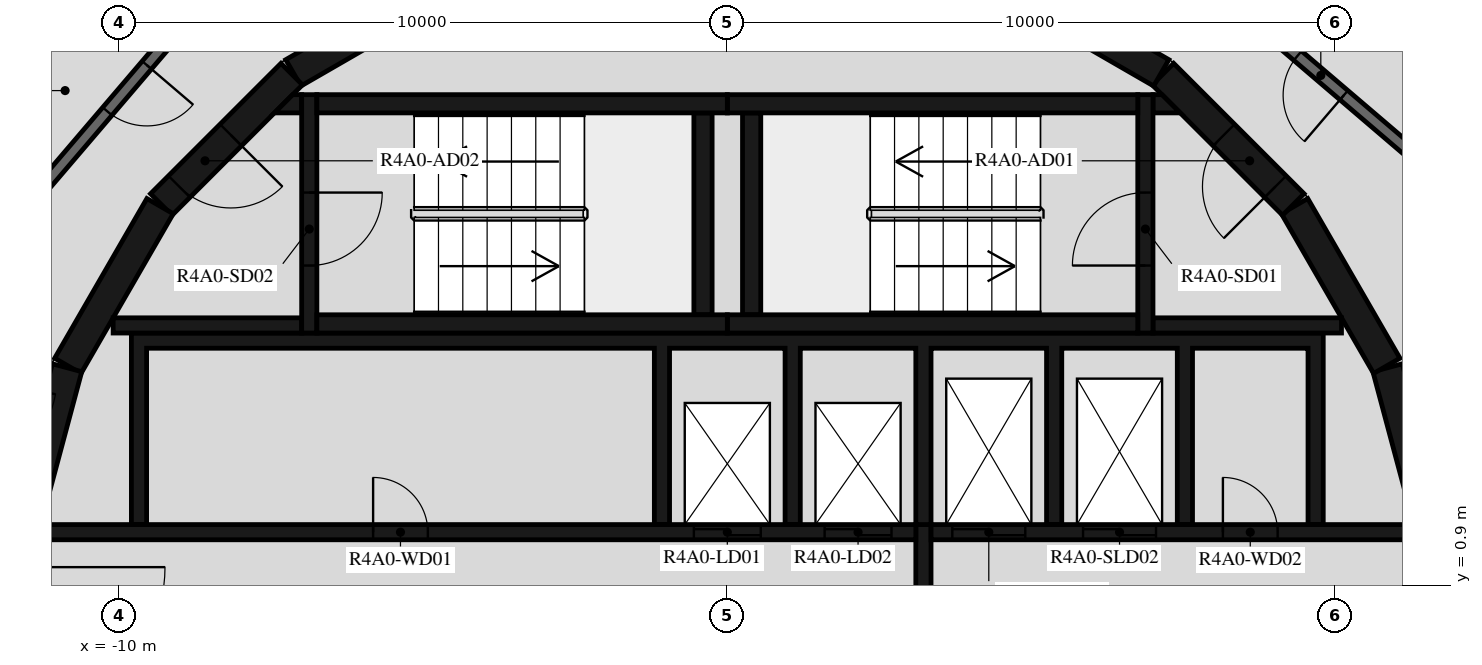
"""IFC4 building model, lengths in metres.
Left out: names, types, materials, properties, quantities, classifications, styles, units other than length and angle.
Written with IfcOpenShell. Run it as: python <this file> out.ifc"""

import sys

from ifc_helpers import new_model, si_unit, direction, frame, frame_2d, origin, place, context, subcontext, project, spatial, polyline, rectangle, outline, extrude, element, fill, save


model = new_model("IFC4")
c1 = context("Model", 3, precision=1e-05, world=origin(), true_north=direction((0.0, 1.0)))
c2 = subcontext(c1, "Body", "Model", "MODEL_VIEW")
j1 = project(units=[si_unit("LENGTHUNIT", "METRE"), si_unit("PLANEANGLEUNIT", "RADIAN")], contexts=[c1])
p1 = place(None, origin())
s1 = spatial("IfcSite", under=j1, at=p1, CompositionType="ELEMENT")
p2 = place(p1, origin())
s2 = spatial("IfcBuilding", under=s1, at=p2, CompositionType="ELEMENT")
p3 = place(p2, frame((0.0, 0.0, 151.7)))
s3 = spatial("IfcBuildingStorey", under=s2, at=p3, CompositionType="ELEMENT", Elevation=151.7)
for number, where, z_axis, x_axis in (
    (1, (11.643, 1.55, 0.0), (0.0, 0.0, 1.0), (-0.259, 0.966, 0.0)),
    (2, (10.845, 4.51, 0.0), (0.0, 0.0, 1.0), (-0.5, 0.866, 0.0)),
):
    element("IfcWall", number, at=place(p3, frame(where, z_axis=z_axis, x_axis=x_axis)), inside=s3, PredefinedType="SHEAR", context=c2, shape_type="SweptSolid", body=[
        extrude(rectangle(XDim=3.033, YDim=0.5, at=frame_2d((1.516, 0.0))), origin(), (0.0, 0.0, 1.0), 3.12),
    ])
p4 = place(p3, frame((9.308, 7.164, 0.0), z_axis=(0.0, 0.0, 1.0), x_axis=(-0.707106781187, 0.707106781187, 0.0)))
e3 = element("IfcWall", 3, at=p4, inside=s3, PredefinedType="SHEAR", context=c2, shape_type="SweptSolid", body=[
    extrude(rectangle(XDim=3.032, YDim=0.5, at=frame_2d((1.516, 0.0))), origin(), (0.0, 0.0, 1.0), 3.12),
])
p5 = place(p4, frame((0.416, 0.0, 0.0)))
e4 = element("IfcOpeningElement", 4, at=p5, cuts=e3, PredefinedType="OPENING", context=c2, shape_type="SweptSolid", body=[
    extrude(rectangle(XDim=1.2, YDim=2.1, at=frame_2d((0.6, 1.05))), frame((0.0, 0.26, 0.0), z_axis=(0.0, -1.0, 0.0), x_axis=(1.0, 0.0, 0.0)), (0.0, 0.0, 1.0), 0.52),
])
for number, where, z_axis, x_axis in (
    (5, (7.137, 9.329, 0.0), (0.0, 0.0, 1.0), (-0.866, 0.5, 0.0)),
    (6, (-4.51, 10.845, 0.0), (0.0, 0.0, 1.0), (-0.866, -0.5, 0.0)),
):
    element("IfcWall", number, at=place(p3, frame(where, z_axis=z_axis, x_axis=x_axis)), inside=s3, PredefinedType="SHEAR", context=c2, shape_type="SweptSolid", body=[
        extrude(rectangle(XDim=3.033, YDim=0.5, at=frame_2d((1.516, 0.0))), origin(), (0.0, 0.0, 1.0), 3.12),
    ])
p6 = place(p3, frame((-7.164, 9.308, 0.0), z_axis=(0.0, 0.0, 1.0), x_axis=(-0.707106781187, -0.707106781187, 0.0)))
e7 = element("IfcWall", 7, at=p6, inside=s3, PredefinedType="SHEAR", context=c2, shape_type="SweptSolid", body=[
    extrude(rectangle(XDim=3.032, YDim=0.5, at=frame_2d((1.516, 0.0))), origin(), (0.0, 0.0, 1.0), 3.12),
])
p7 = place(p6, frame((1.416, 0.0, 0.0)))
e8 = element("IfcOpeningElement", 8, at=p7, cuts=e7, PredefinedType="OPENING", context=c2, shape_type="SweptSolid", body=[
    extrude(rectangle(XDim=1.2, YDim=2.1, at=frame_2d((0.6, 1.05))), frame((0.0, 0.26, 0.0), z_axis=(0.0, -1.0, 0.0), x_axis=(1.0, 0.0, 0.0)), (0.0, 0.0, 1.0), 0.52),
])
for number, where, z_axis, x_axis in (
    (9, (-9.329, 7.137, 0.0), (0.0, 0.0, 1.0), (-0.5, -0.866, 0.0)),
    (10, (-10.858, 4.479, 0.0), (0.0, 0.0, 1.0), (-0.259, -0.966, 0.0)),
):
    element("IfcWall", number, at=place(p3, frame(where, z_axis=z_axis, x_axis=x_axis)), inside=s3, PredefinedType="SHEAR", context=c2, shape_type="SweptSolid", body=[
        extrude(rectangle(XDim=3.033, YDim=0.5, at=frame_2d((1.516, 0.0))), origin(), (0.0, 0.0, 1.0), 3.12),
    ])
for number, where, z_axis, x_axis in (
    (11, (0.0, 5.2, 0.0), (0.0, 0.0, 1.0), (1.0, 0.0, 0.0)),
    (12, (0.0, 8.82, 0.0), (0.0, 0.0, 1.0), (1.0, 0.0, 0.0)),
):
    element("IfcWall", number, at=place(p3, frame(where, z_axis=z_axis, x_axis=x_axis)), inside=s3, PredefinedType="SHEAR", context=c2, shape_type="SweptSolid", body=[
        extrude(rectangle(XDim=6.75, YDim=0.3, at=frame_2d((3.375, 0.0))), origin(), (0.0, 0.0, 1.0), 3.12),
    ])
p8 = place(p3, frame((0.4, 5.35, 0.0), z_axis=(0.0, 0.0, 1.0), x_axis=(0.0, 1.0, 0.0)))
e13 = element("IfcWall", 13, at=p8, inside=s3, PredefinedType="SHEAR", context=c2, shape_type="SweptSolid", body=[
    extrude(rectangle(XDim=3.32, YDim=0.3, at=frame_2d((1.66, 0.0))), origin(), (0.0, 0.0, 1.0), 3.12),
])
p9 = place(p3, frame((6.875, 5.05, 0.0), z_axis=(0.0, 0.0, 1.0), x_axis=(0.0, 1.0, 0.0)))
e14 = element("IfcWall", 14, at=p9, inside=s3, PredefinedType="SHEAR", context=c2, shape_type="SweptSolid", body=[
    extrude(rectangle(XDim=3.92, YDim=0.25, at=frame_2d((1.96, 0.0))), origin(), (0.0, 0.0, 1.0), 3.12),
])
p10 = place(p9, frame((1.11, 0.0, 0.0)))
e15 = element("IfcOpeningElement", 15, at=p10, cuts=e14, PredefinedType="OPENING", context=c2, shape_type="SweptSolid", body=[
    extrude(rectangle(XDim=1.2, YDim=2.1, at=frame_2d((0.6, 1.05))), frame((0.0, 0.135, 0.0), z_axis=(0.0, -1.0, 0.0), x_axis=(1.0, 0.0, 0.0)), (0.0, 0.0, 1.0), 0.27),
])
p11 = place(p3, frame((7.0, 5.175, 0.0), z_axis=(0.0, 0.0, 1.0), x_axis=(1.0, 0.0, 0.0)))
e16 = element("IfcWall", 16, at=p11, inside=s3, PredefinedType="SHEAR", context=c2, shape_type="SweptSolid", body=[
    extrude(rectangle(XDim=3.1, YDim=0.25, at=frame_2d((1.55, 0.0))), origin(), (0.0, 0.0, 1.0), 3.12),
])
p12 = place(p3, origin())
e17 = element("IfcWall", 17, at=p12, inside=s3, PredefinedType="SHEAR", context=c2, shape_type="SweptSolid", body=[
    extrude(outline(polyline([(7.448, 8.67), (7.0, 8.67), (7.0, 8.97), (7.148, 8.97), (7.448, 8.67)])), origin(), (0.0, 0.0, 1.0), 3.12),
])
for number, where, z_axis, x_axis in (
    (18, (-6.75, 5.2, 0.0), (0.0, 0.0, 1.0), (1.0, 0.0, 0.0)),
    (19, (-6.75, 8.82, 0.0), (0.0, 0.0, 1.0), (1.0, 0.0, 0.0)),
):
    element("IfcWall", number, at=place(p3, frame(where, z_axis=z_axis, x_axis=x_axis)), inside=s3, PredefinedType="SHEAR", context=c2, shape_type="SweptSolid", body=[
        extrude(rectangle(XDim=6.75, YDim=0.3, at=frame_2d((3.375, 0.0))), origin(), (0.0, 0.0, 1.0), 3.12),
    ])
p13 = place(p3, frame((-0.4, 5.35, 0.0), z_axis=(0.0, 0.0, 1.0), x_axis=(0.0, 1.0, 0.0)))
e20 = element("IfcWall", 20, at=p13, inside=s3, PredefinedType="SHEAR", context=c2, shape_type="SweptSolid", body=[
    extrude(rectangle(XDim=3.32, YDim=0.3, at=frame_2d((1.66, 0.0))), origin(), (0.0, 0.0, 1.0), 3.12),
])
p14 = place(p3, frame((-6.875, 8.97, 0.0), z_axis=(0.0, 0.0, 1.0), x_axis=(0.0, -1.0, 0.0)))
e21 = element("IfcWall", 21, at=p14, inside=s3, PredefinedType="SHEAR", context=c2, shape_type="SweptSolid", body=[
    extrude(rectangle(XDim=3.92, YDim=0.25, at=frame_2d((1.96, 0.0))), origin(), (0.0, 0.0, 1.0), 3.12),
])
p15 = place(p14, frame((1.61, 0.0, 0.0)))
e22 = element("IfcOpeningElement", 22, at=p15, cuts=e21, PredefinedType="OPENING", context=c2, shape_type="SweptSolid", body=[
    extrude(rectangle(XDim=1.2, YDim=2.1, at=frame_2d((0.6, 1.05))), frame((0.0, 0.135, 0.0), z_axis=(0.0, -1.0, 0.0), x_axis=(1.0, 0.0, 0.0)), (0.0, 0.0, 1.0), 0.27),
])
p16 = place(p3, frame((-7.0, 5.175, 0.0), z_axis=(0.0, 0.0, 1.0), x_axis=(-1.0, 0.0, 0.0)))
e23 = element("IfcWall", 23, at=p16, inside=s3, PredefinedType="SHEAR", context=c2, shape_type="SweptSolid", body=[
    extrude(rectangle(XDim=3.1, YDim=0.25, at=frame_2d((1.55, 0.0))), origin(), (0.0, 0.0, 1.0), 3.12),
])
p17 = place(p3, origin())
e24 = element("IfcWall", 24, at=p17, inside=s3, PredefinedType="SHEAR", context=c2, shape_type="SweptSolid", body=[
    extrude(outline(polyline([(-7.148, 8.97), (-7.0, 8.97), (-7.0, 8.67), (-7.448, 8.67), (-7.148, 8.97)])), origin(), (0.0, 0.0, 1.0), 3.12),
])
p18 = place(p3, origin())
e25 = element("IfcWall", 25, at=p18, inside=s3, PredefinedType="SHEAR", context=c2, shape_type="SweptSolid", body=[
    extrude(outline(polyline([(-9.55, 4.8), (-1.2, 4.8), (-1.2, 1.9), (-0.95, 1.9), (-0.95, 4.8), (0.95, 4.8), (0.95, 1.9), (1.2, 1.9), (1.2, 4.8), (3.1, 4.8), (3.1, 1.9), (3.35, 1.9), (3.35, 4.8), (5.25, 4.8), (5.25, 1.9), (5.5, 1.9), (5.5, 4.8), (7.4, 4.8), (7.4, 1.9), (7.65, 1.9), (7.65, 4.8), (9.55, 4.8), (9.55, 1.9), (9.8, 1.9), (9.8, 4.8), (9.8, 5.05), (-9.8, 5.05), (-9.8, 4.8), (-9.8, 1.9), (-9.55, 1.9), (-9.55, 4.8)])), origin(), (0.0, 0.0, 1.0), 3.12),
])
p19 = place(p3, frame((-11.28, 1.775, 0.0), z_axis=(0.0, 0.0, 1.0), x_axis=(1.0, 0.0, 0.0)))
e26 = element("IfcWall", 26, at=p19, inside=s3, PredefinedType="SHEAR", context=c2, shape_type="SweptSolid", body=[
    extrude(rectangle(XDim=14.38, YDim=0.25, at=frame_2d((7.19, 0.0))), origin(), (0.0, 0.0, 1.0), 3.12),
])
p20 = place(p19, frame((10.73, 0.0, 0.0)))
e27 = element("IfcOpeningElement", 27, at=p20, cuts=e26, PredefinedType="OPENING", context=c2, shape_type="SweptSolid", body=[
    extrude(rectangle(XDim=1.1, YDim=2.1, at=frame_2d((0.55, 1.05))), frame((0.0, 0.135, 0.0), z_axis=(0.0, -1.0, 0.0), x_axis=(1.0, 0.0, 0.0)), (0.0, 0.0, 1.0), 0.27),
])
p21 = place(p19, frame((12.88, 0.0, 0.0)))
e28 = element("IfcOpeningElement", 28, at=p21, cuts=e26, PredefinedType="OPENING", context=c2, shape_type="SweptSolid", body=[
    extrude(rectangle(XDim=1.1, YDim=2.1, at=frame_2d((0.55, 1.05))), frame((0.0, 0.135, 0.0), z_axis=(0.0, -1.0, 0.0), x_axis=(1.0, 0.0, 0.0)), (0.0, 0.0, 1.0), 0.27),
])
p22 = place(p19, frame((5.455, 0.0, 0.0)))
e29 = element("IfcOpeningElement", 29, at=p22, cuts=e26, PredefinedType="OPENING", context=c2, shape_type="SweptSolid", body=[
    extrude(rectangle(XDim=0.9, YDim=2.1, at=frame_2d((0.45, 1.05))), frame((0.0, 0.135, 0.0), z_axis=(0.0, -1.0, 0.0), x_axis=(1.0, 0.0, 0.0)), (0.0, 0.0, 1.0), 0.27),
])
p23 = place(p3, frame((3.35, 1.775, 0.0), z_axis=(0.0, 0.0, 1.0), x_axis=(1.0, 0.0, 0.0)))
e30 = element("IfcWall", 30, at=p23, inside=s3, PredefinedType="SHEAR", context=c2, shape_type="SweptSolid", body=[
    extrude(rectangle(XDim=7.93, YDim=0.25, at=frame_2d((3.965, 0.0))), origin(), (0.0, 0.0, 1.0), 3.12),
])
p24 = place(p23, frame((0.35, 0.0, 0.0)))
e31 = element("IfcOpeningElement", 31, at=p24, cuts=e30, PredefinedType="OPENING", context=c2, shape_type="SweptSolid", body=[
    extrude(rectangle(XDim=1.2, YDim=2.4, at=frame_2d((0.6, 1.2))), frame((0.0, 0.135, 0.0), z_axis=(0.0, -1.0, 0.0), x_axis=(1.0, 0.0, 0.0)), (0.0, 0.0, 1.0), 0.27),
])
p25 = place(p23, frame((2.5, 0.0, 0.0)))
e32 = element("IfcOpeningElement", 32, at=p25, cuts=e30, PredefinedType="OPENING", context=c2, shape_type="SweptSolid", body=[
    extrude(rectangle(XDim=1.2, YDim=2.4, at=frame_2d((0.6, 1.2))), frame((0.0, 0.135, 0.0), z_axis=(0.0, -1.0, 0.0), x_axis=(1.0, 0.0, 0.0)), (0.0, 0.0, 1.0), 0.27),
])
p26 = place(p23, frame((4.8, 0.0, 0.0)))
e33 = element("IfcOpeningElement", 33, at=p26, cuts=e30, PredefinedType="OPENING", context=c2, shape_type="SweptSolid", body=[
    extrude(rectangle(XDim=0.9, YDim=2.1, at=frame_2d((0.45, 1.05))), frame((0.0, 0.135, 0.0), z_axis=(0.0, -1.0, 0.0), x_axis=(1.0, 0.0, 0.0)), (0.0, 0.0, 1.0), 0.27),
])
p27 = place(p3, frame((3.225, -1.9, 0.0), z_axis=(0.0, 0.0, 1.0), x_axis=(0.0, 1.0, 0.0)))
e34 = element("IfcWall", 34, at=p27, inside=s3, PredefinedType="SHEAR", context=c2, shape_type="SweptSolid", body=[
    extrude(rectangle(XDim=3.8, YDim=0.25, at=frame_2d((1.9, 0.0))), origin(), (0.0, 0.0, 1.0), 3.12),
])
p28 = place(p3, frame((11.433, 7.858, 0.0), z_axis=(0.0, 0.0, 1.0), x_axis=(-0.760412154545, 0.649440801937, 0.0)))
e35 = element("IfcWall", 35, at=p28, inside=s3, PredefinedType="STANDARD", context=c2, shape_type="SweptSolid", body=[
    extrude(rectangle(XDim=7.181, YDim=0.2, at=frame_2d((3.59, 0.0))), origin(), (0.0, 0.0, 1.0), 3.12),
])
p29 = place(p28, frame((1.7, 0.0, 0.0)))
e36 = element("IfcOpeningElement", 36, at=p29, cuts=e35, PredefinedType="OPENING", context=c2, shape_type="SweptSolid", body=[
    extrude(rectangle(XDim=1.0, YDim=2.1, at=frame_2d((0.5, 1.05))), frame((0.0, 0.11, 0.0), z_axis=(0.0, -1.0, 0.0), x_axis=(1.0, 0.0, 0.0)), (0.0, 0.0, 1.0), 0.22),
])
p30 = place(p28, frame((5.101, 0.0, 0.0)))
e37 = element("IfcOpeningElement", 37, at=p30, cuts=e35, PredefinedType="OPENING", context=c2, shape_type="SweptSolid", body=[
    extrude(rectangle(XDim=1.0, YDim=2.1, at=frame_2d((0.5, 1.05))), frame((0.0, 0.11, 0.0), z_axis=(0.0, -1.0, 0.0), x_axis=(1.0, 0.0, 0.0)), (0.0, 0.0, 1.0), 0.22),
])
p31 = place(p3, frame((-7.858, 11.433, 0.0), z_axis=(0.0, 0.0, 1.0), x_axis=(-0.649440801937, -0.760412154545, 0.0)))
e38 = element("IfcWall", 38, at=p31, inside=s3, PredefinedType="STANDARD", context=c2, shape_type="SweptSolid", body=[
    extrude(rectangle(XDim=7.181, YDim=0.2, at=frame_2d((3.59, 0.0))), origin(), (0.0, 0.0, 1.0), 3.12),
])
p32 = place(p31, frame((2.6, 0.0, 0.0)))
e39 = element("IfcOpeningElement", 39, at=p32, cuts=e38, PredefinedType="OPENING", context=c2, shape_type="SweptSolid", body=[
    extrude(rectangle(XDim=1.0, YDim=2.1, at=frame_2d((0.5, 1.05))), frame((0.0, 0.11, 0.0), z_axis=(0.0, -1.0, 0.0), x_axis=(1.0, 0.0, 0.0)), (0.0, 0.0, 1.0), 0.22),
])
p33 = place(p3, frame((-8.929, 12.488, 0.0), z_axis=(0.0, 0.0, 1.0), x_axis=(-0.64944646045, -0.760407321775, 0.0)))
e40 = element("IfcWall", 40, at=p33, inside=s3, PredefinedType="PARTITIONING", context=c2, shape_type="SweptSolid", body=[
    extrude(rectangle(XDim=7.69, YDim=0.12, at=frame_2d((3.845, 0.0))), origin(), (0.0, 0.0, 1.0), 3.12),
])
p34 = place(p33, frame((0.4, 0.0, 0.0)))
e41 = element("IfcOpeningElement", 41, at=p34, cuts=e40, PredefinedType="OPENING", context=c2, shape_type="SweptSolid", body=[
    extrude(rectangle(XDim=0.8, YDim=2.1, at=frame_2d((0.4, 1.05))), frame((0.0, 0.07, 0.0), z_axis=(0.0, -1.0, 0.0), x_axis=(1.0, 0.0, 0.0)), (0.0, 0.0, 1.0), 0.14),
])
p35 = place(p33, frame((6.356, 0.0, 0.0)))
e42 = element("IfcOpeningElement", 42, at=p35, cuts=e40, PredefinedType="OPENING", context=c2, shape_type="SweptSolid", body=[
    extrude(rectangle(XDim=0.9, YDim=2.1, at=frame_2d((0.45, 1.05))), frame((0.0, 0.07, 0.0), z_axis=(0.0, -1.0, 0.0), x_axis=(1.0, 0.0, 0.0)), (0.0, 0.0, 1.0), 0.14),
])
p36 = place(p3, frame((-10.618, 20.262, 0.0), z_axis=(0.0, 0.0, 1.0), x_axis=(-0.182222468274, -0.983257327487, 0.0)))
e43 = element("IfcWall", 43, at=p36, inside=s3, PredefinedType="PARTITIONING", context=c2, shape_type="SweptSolid", body=[
    extrude(rectangle(XDim=12.667, YDim=0.12, at=frame_2d((6.333, 0.0))), origin(), (0.0, 0.0, 1.0), 3.12),
])
p37 = place(p36, frame((2.57, 0.0, 0.0)))
e44 = element("IfcOpeningElement", 44, at=p37, cuts=e43, PredefinedType="OPENING", context=c2, shape_type="SweptSolid", body=[
    extrude(rectangle(XDim=0.9, YDim=2.1, at=frame_2d((0.45, 1.05))), frame((0.0, 0.07, 0.0), z_axis=(0.0, -1.0, 0.0), x_axis=(1.0, 0.0, 0.0)), (0.0, 0.0, 1.0), 0.14),
])
p38 = place(p10, origin())
e45 = element("IfcDoor", 45, at=p38, inside=s3, OperationType="SINGLE_SWING_LEFT", PredefinedType="DOOR", context=c2, shape_type="SweptSolid", body=[
    extrude(rectangle(XDim=1.2, YDim=2.1, at=frame_2d((0.6, 1.05))), frame((0.0, 0.025, 0.0), z_axis=(0.0, -1.0, 0.0), x_axis=(1.0, 0.0, 0.0)), (0.0, 0.0, 1.0), 0.05),
])
fill(e15, e45)
p39 = place(p5, origin())
e46 = element("IfcDoor", 46, at=p39, inside=s3, OperationType="SINGLE_SWING_RIGHT", PredefinedType="DOOR", context=c2, shape_type="SweptSolid", body=[
    extrude(rectangle(XDim=1.2, YDim=2.1, at=frame_2d((0.6, 1.05))), frame((0.0, 0.025, 0.0), z_axis=(0.0, -1.0, 0.0), x_axis=(1.0, 0.0, 0.0)), (0.0, 0.0, 1.0), 0.05),
])
fill(e4, e46)
p40 = place(p15, origin())
e47 = element("IfcDoor", 47, at=p40, inside=s3, OperationType="SINGLE_SWING_LEFT", PredefinedType="DOOR", context=c2, shape_type="SweptSolid", body=[
    extrude(rectangle(XDim=1.2, YDim=2.1, at=frame_2d((0.6, 1.05))), frame((0.0, 0.025, 0.0), z_axis=(0.0, -1.0, 0.0), x_axis=(1.0, 0.0, 0.0)), (0.0, 0.0, 1.0), 0.05),
])
fill(e22, e47)
p41 = place(p7, origin())
e48 = element("IfcDoor", 48, at=p41, inside=s3, OperationType="SINGLE_SWING_RIGHT", PredefinedType="DOOR", context=c2, shape_type="SweptSolid", body=[
    extrude(rectangle(XDim=1.2, YDim=2.1, at=frame_2d((0.6, 1.05))), frame((0.0, 0.025, 0.0), z_axis=(0.0, -1.0, 0.0), x_axis=(1.0, 0.0, 0.0)), (0.0, 0.0, 1.0), 0.05),
])
fill(e8, e48)
p42 = place(p20, origin())
e49 = element("IfcDoor", 49, at=p42, inside=s3, OperationType="DOUBLE_DOOR_SLIDING", PredefinedType="DOOR", context=c2, shape_type="SweptSolid", body=[
    extrude(rectangle(XDim=1.1, YDim=2.1, at=frame_2d((0.55, 1.05))), frame((0.0, 0.025, 0.0), z_axis=(0.0, -1.0, 0.0), x_axis=(1.0, 0.0, 0.0)), (0.0, 0.0, 1.0), 0.05),
])
fill(e27, e49)
p43 = place(p21, origin())
e50 = element("IfcDoor", 50, at=p43, inside=s3, OperationType="DOUBLE_DOOR_SLIDING", PredefinedType="DOOR", context=c2, shape_type="SweptSolid", body=[
    extrude(rectangle(XDim=1.1, YDim=2.1, at=frame_2d((0.55, 1.05))), frame((0.0, 0.025, 0.0), z_axis=(0.0, -1.0, 0.0), x_axis=(1.0, 0.0, 0.0)), (0.0, 0.0, 1.0), 0.05),
])
fill(e28, e50)
p44 = place(p24, origin())
e51 = element("IfcDoor", 51, at=p44, inside=s3, OperationType="DOUBLE_DOOR_SLIDING", PredefinedType="DOOR", context=c2, shape_type="SweptSolid", body=[
    extrude(rectangle(XDim=1.2, YDim=2.4, at=frame_2d((0.6, 1.2))), frame((0.0, 0.025, 0.0), z_axis=(0.0, -1.0, 0.0), x_axis=(1.0, 0.0, 0.0)), (0.0, 0.0, 1.0), 0.05),
])
fill(e31, e51)
p45 = place(p25, origin())
e52 = element("IfcDoor", 52, at=p45, inside=s3, OperationType="DOUBLE_DOOR_SLIDING", PredefinedType="DOOR", context=c2, shape_type="SweptSolid", body=[
    extrude(rectangle(XDim=1.2, YDim=2.4, at=frame_2d((0.6, 1.2))), frame((0.0, 0.025, 0.0), z_axis=(0.0, -1.0, 0.0), x_axis=(1.0, 0.0, 0.0)), (0.0, 0.0, 1.0), 0.05),
])
fill(e32, e52)
p46 = place(p22, origin())
e53 = element("IfcDoor", 53, at=p46, inside=s3, OperationType="SINGLE_SWING_LEFT", PredefinedType="DOOR", context=c2, shape_type="SweptSolid", body=[
    extrude(rectangle(XDim=0.9, YDim=2.1, at=frame_2d((0.45, 1.05))), frame((0.0, 0.025, 0.0), z_axis=(0.0, -1.0, 0.0), x_axis=(1.0, 0.0, 0.0)), (0.0, 0.0, 1.0), 0.05),
])
fill(e29, e53)
p47 = place(p26, origin())
e54 = element("IfcDoor", 54, at=p47, inside=s3, OperationType="SINGLE_SWING_RIGHT", PredefinedType="DOOR", context=c2, shape_type="SweptSolid", body=[
    extrude(rectangle(XDim=0.9, YDim=2.1, at=frame_2d((0.45, 1.05))), frame((0.0, 0.025, 0.0), z_axis=(0.0, -1.0, 0.0), x_axis=(1.0, 0.0, 0.0)), (0.0, 0.0, 1.0), 0.05),
])
fill(e33, e54)
p48 = place(p29, origin())
e55 = element("IfcDoor", 55, at=p48, inside=s3, OperationType="SINGLE_SWING_LEFT", PredefinedType="DOOR", context=c2, shape_type="SweptSolid", body=[
    extrude(rectangle(XDim=1.0, YDim=2.1, at=frame_2d((0.5, 1.05))), frame((0.0, 0.025, 0.0), z_axis=(0.0, -1.0, 0.0), x_axis=(1.0, 0.0, 0.0)), (0.0, 0.0, 1.0), 0.05),
])
fill(e36, e55)
p49 = place(p32, origin())
e56 = element("IfcDoor", 56, at=p49, inside=s3, OperationType="SINGLE_SWING_LEFT", PredefinedType="DOOR", context=c2, shape_type="SweptSolid", body=[
    extrude(rectangle(XDim=1.0, YDim=2.1, at=frame_2d((0.5, 1.05))), frame((0.0, 0.025, 0.0), z_axis=(0.0, -1.0, 0.0), x_axis=(1.0, 0.0, 0.0)), (0.0, 0.0, 1.0), 0.05),
])
fill(e39, e56)
save(model, sys.argv[1])
